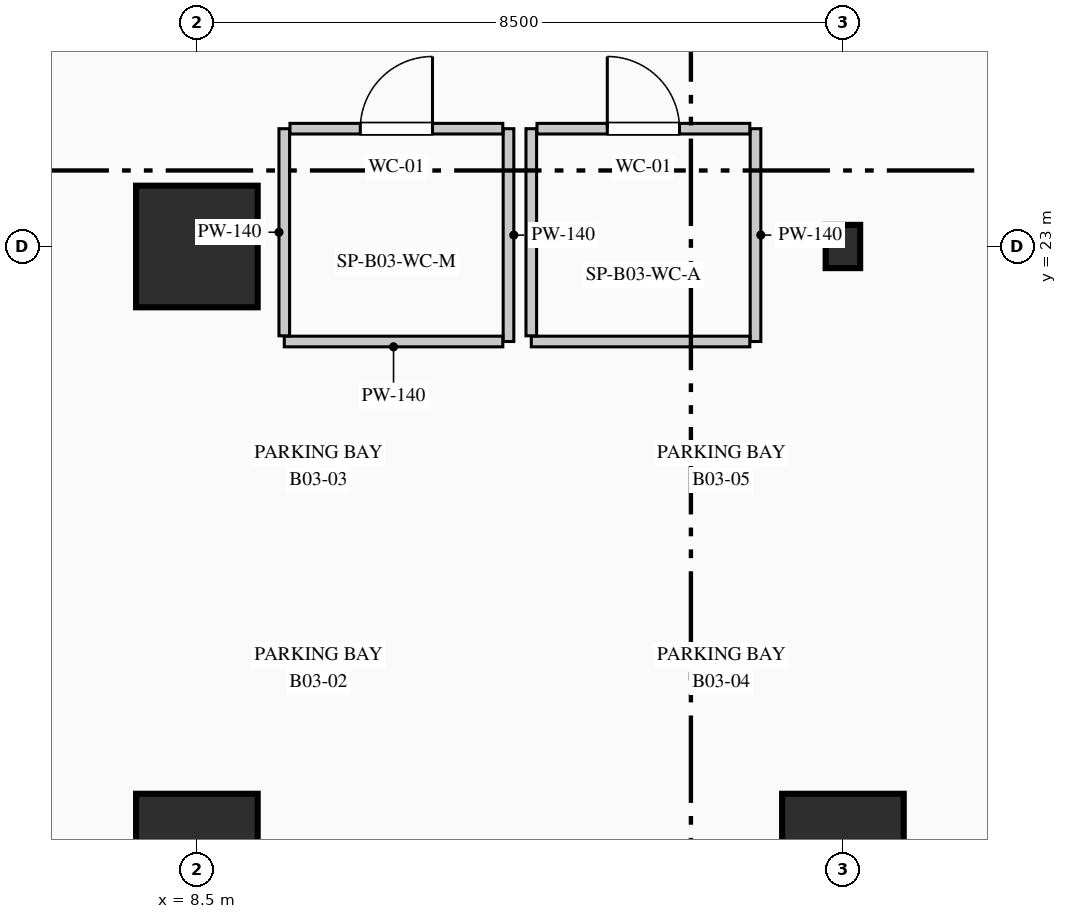
"""IFC4 building model, lengths in metres.
Left out: names, types, materials, properties, quantities, classifications, styles, units other than length and angle.
Written with IfcOpenShell. Run it as: python <this file> out.ifc"""

import sys

from ifc_helpers import new_model, si_unit, direction, frame, frame_2d, origin, origin_2d, place, context, subcontext, project, spatial, rectangle, i_section, extrude, element, fill, save


model = new_model("IFC4")
c1 = context("Model", 3, precision=1e-05, world=origin(), true_north=direction((0.0, 1.0)))
c2 = subcontext(c1, "Body", "Model", "MODEL_VIEW")
j1 = project(units=[si_unit("LENGTHUNIT", "METRE"), si_unit("PLANEANGLEUNIT", "RADIAN")], contexts=[c1])
p1 = place(None, origin())
s1 = spatial("IfcSite", under=j1, at=p1, CompositionType="ELEMENT")
p2 = place(p1, origin())
s2 = spatial("IfcBuilding", under=s1, at=p2, CompositionType="ELEMENT")
p3 = place(p2, frame((0.0, 0.0, -13.5)))
s3 = spatial("IfcBuildingStorey", under=s2, at=p3, CompositionType="ELEMENT", Elevation=-13.5)
for number, where, z_axis, x_axis in (
    (1, (8.5, 15.0, 0.0), (0.0, 0.0, 1.0), (1.0, 0.0, 0.0)),
    (2, (8.5, 23.0, 0.0), (0.0, 0.0, 1.0), (1.0, 0.0, 0.0)),
    (3, (17.0, 15.0, 0.0), (0.0, 0.0, 1.0), (1.0, 0.0, 0.0)),
):
    element("IfcColumn", number, at=place(p3, frame(where, z_axis=z_axis, x_axis=x_axis)), inside=s3, PredefinedType="COLUMN", context=c2, shape_type="SweptSolid", body=[
        extrude(rectangle(XDim=1.6, YDim=1.6, at=origin_2d()), origin(), (0.0, 0.0, 1.0), 4.5),
    ])
p4 = place(p3, frame((17.0, 23.0, 0.0), z_axis=(0.0, 0.0, 1.0), x_axis=(1.0, 0.0, 0.0)))
e4 = element("IfcColumn", 4, at=p4, inside=s3, PredefinedType="COLUMN", context=c2, shape_type="SweptSolid", body=[
    extrude(i_section(OverallWidth=0.454, OverallDepth=0.569, WebThickness=0.078, FlangeThickness=0.08, FilletRadius=0.015, at=origin_2d()), origin(), (0.0, 0.0, 1.0), 4.5),
])
p5 = place(p3, frame((12.6, 24.55, 0.0), z_axis=(0.0, 0.0, 1.0), x_axis=(0.0, -1.0, 0.0)))
e5 = element("IfcWall", 5, at=p5, inside=s3, PredefinedType="PARTITIONING", context=c2, shape_type="SweptSolid", body=[
    extrude(rectangle(XDim=2.8, YDim=0.14, at=frame_2d((1.4, 0.0))), origin(), (0.0, 0.0, 1.0), 3.685),
])
p6 = place(p3, frame((12.525, 21.75, 0.0), z_axis=(0.0, 0.0, 1.0), x_axis=(-1.0, 0.0, 0.0)))
e6 = element("IfcWall", 6, at=p6, inside=s3, PredefinedType="PARTITIONING", context=c2, shape_type="SweptSolid", body=[
    extrude(rectangle(XDim=2.875, YDim=0.14, at=frame_2d((1.438, 0.0))), origin(), (0.0, 0.0, 1.0), 4.15),
])
p7 = place(p3, frame((9.65, 21.825, 0.0), z_axis=(0.0, 0.0, 1.0), x_axis=(0.0, 1.0, 0.0)))
e7 = element("IfcWall", 7, at=p7, inside=s3, PredefinedType="PARTITIONING", context=c2, shape_type="SweptSolid", body=[
    extrude(rectangle(XDim=2.725, YDim=0.14, at=frame_2d((1.363, 0.0))), origin(), (0.0, 0.0, 1.0), 3.685),
])
p8 = place(p3, frame((9.725, 24.55, 0.0), z_axis=(0.0, 0.0, 1.0), x_axis=(1.0, 0.0, 0.0)))
e8 = element("IfcWall", 8, at=p8, inside=s3, PredefinedType="PARTITIONING", context=c2, shape_type="SweptSolid", body=[
    extrude(rectangle(XDim=2.8, YDim=0.14, at=frame_2d((1.4, 0.0))), origin(), (0.0, 0.0, 1.0), 4.15),
])
p9 = place(p8, frame((0.925, 0.0, 0.0)))
e9 = element("IfcOpeningElement", 9, at=p9, cuts=e8, PredefinedType="OPENING", context=c2, shape_type="SweptSolid", body=[
    extrude(rectangle(XDim=0.95, YDim=2.15, at=frame_2d((0.475, 1.075))), frame((0.0, 0.08, 0.0), z_axis=(0.0, -1.0, 0.0), x_axis=(1.0, 0.0, 0.0)), (0.0, 0.0, 1.0), 0.16),
])
p10 = place(p3, frame((15.85, 24.55, 0.0), z_axis=(0.0, 0.0, 1.0), x_axis=(0.0, -1.0, 0.0)))
e10 = element("IfcWall", 10, at=p10, inside=s3, PredefinedType="PARTITIONING", context=c2, shape_type="SweptSolid", body=[
    extrude(rectangle(XDim=2.8, YDim=0.14, at=frame_2d((1.4, 0.0))), origin(), (0.0, 0.0, 1.0), 3.685),
])
p11 = place(p3, frame((15.775, 21.75, 0.0), z_axis=(0.0, 0.0, 1.0), x_axis=(-1.0, 0.0, 0.0)))
e11 = element("IfcWall", 11, at=p11, inside=s3, PredefinedType="PARTITIONING", context=c2, shape_type="SweptSolid", body=[
    extrude(rectangle(XDim=2.875, YDim=0.14, at=frame_2d((1.438, 0.0))), origin(), (0.0, 0.0, 1.0), 4.15),
])
p12 = place(p3, frame((12.9, 21.825, 0.0), z_axis=(0.0, 0.0, 1.0), x_axis=(0.0, 1.0, 0.0)))
e12 = element("IfcWall", 12, at=p12, inside=s3, PredefinedType="PARTITIONING", context=c2, shape_type="SweptSolid", body=[
    extrude(rectangle(XDim=2.725, YDim=0.14, at=frame_2d((1.363, 0.0))), origin(), (0.0, 0.0, 1.0), 3.685),
])
p13 = place(p3, frame((12.975, 24.55, 0.0), z_axis=(0.0, 0.0, 1.0), x_axis=(1.0, 0.0, 0.0)))
e13 = element("IfcWall", 13, at=p13, inside=s3, PredefinedType="PARTITIONING", context=c2, shape_type="SweptSolid", body=[
    extrude(rectangle(XDim=2.8, YDim=0.14, at=frame_2d((1.4, 0.0))), origin(), (0.0, 0.0, 1.0), 4.15),
])
p14 = place(p13, frame((0.925, 0.0, 0.0)))
e14 = element("IfcOpeningElement", 14, at=p14, cuts=e13, PredefinedType="OPENING", context=c2, shape_type="SweptSolid", body=[
    extrude(rectangle(XDim=0.95, YDim=2.15, at=frame_2d((0.475, 1.075))), frame((0.0, 0.08, 0.0), z_axis=(0.0, -1.0, 0.0), x_axis=(1.0, 0.0, 0.0)), (0.0, 0.0, 1.0), 0.16),
])
p15 = place(p9, origin())
e15 = element("IfcDoor", 15, at=p15, inside=s3, OperationType="SINGLE_SWING_RIGHT", PredefinedType="DOOR", context=c2, shape_type="SweptSolid", body=[
    extrude(rectangle(XDim=0.95, YDim=2.15, at=frame_2d((0.475, 1.075))), frame((0.0, 0.025, 0.0), z_axis=(0.0, -1.0, 0.0), x_axis=(1.0, 0.0, 0.0)), (0.0, 0.0, 1.0), 0.05),
])
fill(e9, e15)
p16 = place(p14, origin())
e16 = element("IfcDoor", 16, at=p16, inside=s3, OperationType="SINGLE_SWING_LEFT", PredefinedType="DOOR", context=c2, shape_type="SweptSolid", body=[
    extrude(rectangle(XDim=0.95, YDim=2.15, at=frame_2d((0.475, 1.075))), frame((0.0, 0.025, 0.0), z_axis=(0.0, -1.0, 0.0), x_axis=(1.0, 0.0, 0.0)), (0.0, 0.0, 1.0), 0.05),
])
fill(e14, e16)
save(model, sys.argv[1])
